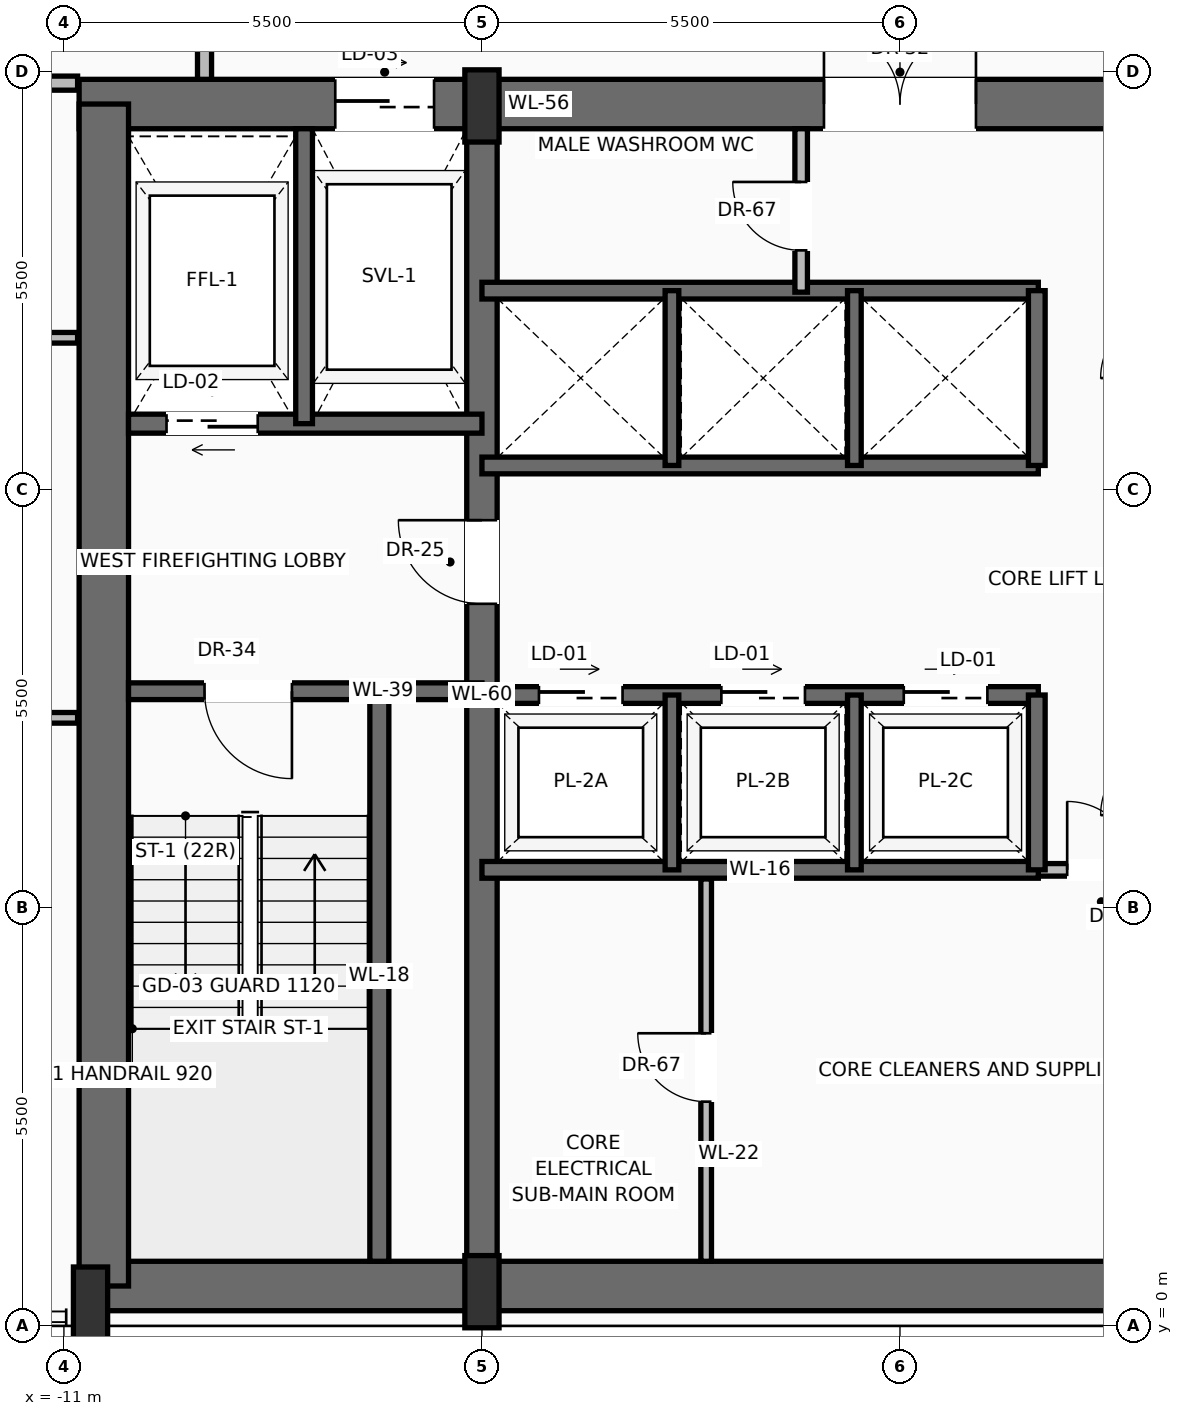
"""IFC4 building model, lengths in metres.
Left out: names, types, materials, properties, quantities, classifications, styles, units other than length and angle.
Written with IfcOpenShell. Run it as: python <this file> out.ifc"""

import sys

from ifc_helpers import new_model, si_unit, direction, frame, frame_2d, origin, origin_2d, place, context, subcontext, project, spatial, rectangle, extrude, source, transform, mapped, element, fill, save


model = new_model("IFC4")
c1 = context("Model", 3, precision=1e-05, world=origin(), true_north=direction((0.0, 1.0)))
c2 = subcontext(c1, "Body", "Model", "MODEL_VIEW")
j1 = project(units=[si_unit("LENGTHUNIT", "METRE"), si_unit("PLANEANGLEUNIT", "RADIAN")], contexts=[c1])
p1 = place(None, origin())
s1 = spatial("IfcSite", under=j1, at=p1, CompositionType="ELEMENT")
p2 = place(p1, origin())
s2 = spatial("IfcBuilding", under=s1, at=p2, CompositionType="ELEMENT")
p3 = place(p2, frame((0.0, 0.0, 189.5)))
s3 = spatial("IfcBuildingStorey", under=s2, at=p3, CompositionType="ELEMENT", Elevation=189.5)
p4 = place(p3, frame((-10.65, 0.525, 0.0), z_axis=(0.0, 0.0, 1.0), x_axis=(1.0, 0.0, 0.0)))
e1 = element("IfcWall", 1, at=p4, inside=s3, PredefinedType="SHEAR", context=c2, shape_type="SweptSolid", body=[
    extrude(rectangle(XDim=21.3, YDim=0.65, at=frame_2d((10.65, 0.0))), origin(), (0.0, 0.0, 1.0), 3.47),
])
p5 = place(p3, frame((-10.8, 16.075, 0.0), z_axis=(0.0, 0.0, 1.0), x_axis=(1.0, 0.0, 0.0)))
e2 = element("IfcWall", 2, at=p5, inside=s3, PredefinedType="SHEAR", context=c2, shape_type="SweptSolid", body=[
    extrude(rectangle(XDim=21.6, YDim=0.65, at=frame_2d((10.8, 0.0))), origin(), (0.0, 0.0, 1.0), 3.47),
])
p6 = place(p5, frame((3.37, 0.0, 0.0)))
e3 = element("IfcOpeningElement", 3, at=p6, cuts=e2, PredefinedType="OPENING", context=c2, shape_type="SweptSolid", body=[
    extrude(rectangle(XDim=1.3, YDim=2.3, at=frame_2d((0.65, 1.15))), frame((0.0, 0.335, 0.0), z_axis=(0.0, -1.0, 0.0), x_axis=(1.0, 0.0, 0.0)), (0.0, 0.0, 1.0), 0.67),
])
p7 = place(p5, frame((9.8, 0.0, 0.0)))
e4 = element("IfcOpeningElement", 4, at=p7, cuts=e2, PredefinedType="OPENING", context=c2, shape_type="SweptSolid", body=[
    extrude(rectangle(XDim=2.0, YDim=2.4, at=frame_2d((1.0, 1.2))), frame((0.0, 0.335, 0.0), z_axis=(0.0, -1.0, 0.0), x_axis=(1.0, 0.0, 0.0)), (0.0, 0.0, 1.0), 0.67),
])
p8 = place(p3, frame((-10.475, 0.525, 0.0), z_axis=(0.0, 0.0, 1.0), x_axis=(0.0, 1.0, 0.0)))
e5 = element("IfcWall", 5, at=p8, inside=s3, PredefinedType="SHEAR", context=c2, shape_type="SweptSolid", body=[
    extrude(rectangle(XDim=15.55, YDim=0.65, at=frame_2d((7.775, 0.0))), origin(), (0.0, 0.0, 1.0), 3.47),
])
p9 = place(p3, frame((-5.5, 0.525, 0.0), z_axis=(0.0, 0.0, 1.0), x_axis=(0.0, 1.0, 0.0)))
e6 = element("IfcWall", 6, at=p9, inside=s3, PredefinedType="SHEAR", context=c2, shape_type="SweptSolid", body=[
    extrude(rectangle(XDim=15.55, YDim=0.4, at=frame_2d((7.775, 0.0))), origin(), (0.0, 0.0, 1.0), 3.47),
])
p10 = place(p9, frame((8.975, 0.0, 0.0)))
e7 = element("IfcOpeningElement", 7, at=p10, cuts=e6, PredefinedType="OPENING", context=c2, shape_type="SweptSolid", body=[
    extrude(rectangle(XDim=1.1, YDim=2.2, at=frame_2d((0.55, 1.1))), frame((0.0, 0.21, 0.0), z_axis=(0.0, -1.0, 0.0), x_axis=(1.0, 0.0, 0.0)), (0.0, 0.0, 1.0), 0.42),
])
m1 = source(origin(), c2, "Body", "SweptSolid", [
    extrude(rectangle(XDim=0.45, YDim=0.95, at=origin_2d()), origin(), (0.0, 0.0, 1.0), 3.7),
])
for number, where, z_axis, x_axis in (
    (8, (-10.65, 0.3, 0.0), (0.0, 0.0, 1.0), (1.0, 0.0, 0.0)),
    (9, (-5.5, 0.45, 0.0), (0.0, 0.0, 1.0), (1.0, 0.0, 0.0)),
    (10, (-5.5, 16.05, 0.0), (0.0, 0.0, 1.0), (1.0, 0.0, 0.0)),
):
    element("IfcColumn", number, at=place(p3, frame(where, z_axis=z_axis, x_axis=x_axis)), inside=s3, PredefinedType="PILASTER", context=c2, shape_type="MappedRepresentation", body=[
        mapped(m1, transform((0.0, 0.0, 0.0), scale=1.0)),
    ])
p11 = place(p3, frame((-20.322, 16.21, 0.0), z_axis=(0.0, 0.0, 1.0), x_axis=(0.525894981058, 0.850549509963, 0.0)))
e11 = element("IfcWall", 11, at=p11, inside=s3, PredefinedType="SOLIDWALL", context=c2, shape_type="SweptSolid", body=[
    extrude(rectangle(XDim=18.948, YDim=0.28, at=frame_2d((9.474, 0.0))), origin(), (0.0, 0.0, 1.0), 3.05),
])
p12 = place(p11, frame((4.547, 0.0, 0.0)))
e12 = element("IfcOpeningElement", 12, at=p12, cuts=e11, PredefinedType="OPENING", context=c2, shape_type="SweptSolid", body=[
    extrude(rectangle(XDim=1.6, YDim=2.35, at=frame_2d((0.8, 1.175))), frame((0.0, 0.15, 0.0), z_axis=(0.0, -1.0, 0.0), x_axis=(1.0, 0.0, 0.0)), (0.0, 0.0, 1.0), 0.3),
])
p13 = place(p11, frame((12.884, 0.0, 0.9)))
e13 = element("IfcOpeningElement", 13, at=p13, cuts=e11, PredefinedType="OPENING", context=c2, shape_type="SweptSolid", body=[
    extrude(rectangle(XDim=2.0, YDim=1.85, at=frame_2d((1.0, 0.925))), frame((0.0, 0.15, 0.0), z_axis=(0.0, -1.0, 0.0), x_axis=(1.0, 0.0, 0.0)), (0.0, 0.0, 1.0), 0.3),
])
p14 = place(p3, frame((-6.85, 0.85, 0.0), z_axis=(0.0, 0.0, 1.0), x_axis=(0.0, 1.0, 0.0)))
e14 = element("IfcWall", 14, at=p14, inside=s3, PredefinedType="SOLIDWALL", context=c2, shape_type="SweptSolid", body=[
    extrude(rectangle(XDim=7.5, YDim=0.25, at=frame_2d((3.75, 0.0))), origin(), (0.0, 0.0, 1.0), 3.47),
])
p15 = place(p3, frame((-5.5, 8.35, 0.0), z_axis=(0.0, 0.0, 1.0), x_axis=(-1.0, 0.0, 0.0)))
e15 = element("IfcWall", 15, at=p15, inside=s3, PredefinedType="SOLIDWALL", context=c2, shape_type="SweptSolid", body=[
    extrude(rectangle(XDim=4.65, YDim=0.22, at=frame_2d((2.325, 0.0))), origin(), (0.0, 0.0, 1.0), 3.47),
])
p16 = place(p15, frame((2.5, 0.0, 0.0)))
e16 = element("IfcOpeningElement", 16, at=p16, cuts=e15, PredefinedType="OPENING", context=c2, shape_type="SweptSolid", body=[
    extrude(rectangle(XDim=1.15, YDim=2.2, at=frame_2d((0.575, 1.1))), frame((0.0, 0.12, 0.0), z_axis=(0.0, -1.0, 0.0), x_axis=(1.0, 0.0, 0.0)), (0.0, 0.0, 1.0), 0.24),
])
p17 = place(p3, frame((-5.5, 11.87, 0.0), z_axis=(0.0, 0.0, 1.0), x_axis=(-1.0, 0.0, 0.0)))
e17 = element("IfcWall", 17, at=p17, inside=s3, PredefinedType="SOLIDWALL", context=c2, shape_type="SweptSolid", body=[
    extrude(rectangle(XDim=4.65, YDim=0.25, at=frame_2d((2.325, 0.0))), origin(), (0.0, 0.0, 1.0), 3.47),
])
p18 = place(p17, frame((2.95, 0.0, 0.0)))
e18 = element("IfcOpeningElement", 18, at=p18, cuts=e17, PredefinedType="OPENING", context=c2, shape_type="SweptSolid", body=[
    extrude(rectangle(XDim=1.2, YDim=2.25, at=frame_2d((0.6, 1.125))), frame((0.0, 0.135, 0.0), z_axis=(0.0, -1.0, 0.0), x_axis=(1.0, 0.0, 0.0)), (0.0, 0.0, 1.0), 0.27),
])
p19 = place(p3, frame((-7.84, 11.87, 0.0), z_axis=(0.0, 0.0, 1.0), x_axis=(0.0, 1.0, 0.0)))
e19 = element("IfcWall", 19, at=p19, inside=s3, PredefinedType="SOLIDWALL", context=c2, shape_type="SweptSolid", body=[
    extrude(rectangle(XDim=3.88, YDim=0.22, at=frame_2d((1.94, 0.0))), origin(), (0.0, 0.0, 1.0), 3.47),
])
p20 = place(p3, frame((1.82, 6.0, 0.0), z_axis=(0.0, 0.0, 1.0), x_axis=(1.0, 0.0, 0.0)))
e20 = element("IfcWall", 20, at=p20, inside=s3, PredefinedType="PARTITIONING", context=c2, shape_type="SweptSolid", body=[
    extrude(rectangle(XDim=3.48, YDim=0.165, at=frame_2d((1.74, 0.0))), origin(), (0.0, 0.0, 1.0), 3.462),
])
p21 = place(p20, frame((0.38, 0.0, 0.0)))
e21 = element("IfcOpeningElement", 21, at=p21, cuts=e20, PredefinedType="OPENING", context=c2, shape_type="SweptSolid", body=[
    extrude(rectangle(XDim=0.9, YDim=2.1, at=frame_2d((0.45, 1.05))), frame((0.0, 0.093, 0.0), z_axis=(0.0, -1.0, 0.0), x_axis=(1.0, 0.0, 0.0)), (0.0, 0.0, 1.0), 0.185),
])
p22 = place(p3, frame((-2.55, 0.85, 0.0), z_axis=(0.0, 0.0, 1.0), x_axis=(0.0, 1.0, 0.0)))
e22 = element("IfcWall", 22, at=p22, inside=s3, PredefinedType="PARTITIONING", context=c2, shape_type="SweptSolid", body=[
    extrude(rectangle(XDim=5.03, YDim=0.14, at=frame_2d((2.515, 0.0))), origin(), (0.0, 0.0, 1.0), 3.462),
])
p23 = place(p22, frame((2.1, 0.0, 0.0)))
e23 = element("IfcOpeningElement", 23, at=p23, cuts=e22, PredefinedType="OPENING", context=c2, shape_type="SweptSolid", body=[
    extrude(rectangle(XDim=0.9, YDim=2.1, at=frame_2d((0.45, 1.05))), frame((0.0, 0.08, 0.0), z_axis=(0.0, -1.0, 0.0), x_axis=(1.0, 0.0, 0.0)), (0.0, 0.0, 1.0), 0.16),
])
p24 = place(p3, frame((-5.5, 6.0, 0.0), z_axis=(0.0, 0.0, 1.0), x_axis=(1.0, 0.0, 0.0)))
e24 = element("IfcWall", 24, at=p24, inside=s3, PredefinedType="SOLIDWALL", context=c2, shape_type="SweptSolid", body=[
    extrude(rectangle(XDim=7.32, YDim=0.22, at=frame_2d((3.66, 0.0))), origin(), (0.0, 0.0, 1.0), 3.47),
])
p25 = place(p3, frame((-5.5, 8.3, 0.0), z_axis=(0.0, 0.0, 1.0), x_axis=(1.0, 0.0, 0.0)))
e25 = element("IfcWall", 25, at=p25, inside=s3, PredefinedType="SOLIDWALL", context=c2, shape_type="SweptSolid", body=[
    extrude(rectangle(XDim=7.32, YDim=0.22, at=frame_2d((3.66, 0.0))), origin(), (0.0, 0.0, 1.0), 3.47),
])
p26 = place(p25, frame((0.75, 0.0, 0.0)))
e26 = element("IfcOpeningElement", 26, at=p26, cuts=e25, PredefinedType="OPENING", context=c2, shape_type="SweptSolid", body=[
    extrude(rectangle(XDim=1.1, YDim=2.2, at=frame_2d((0.55, 1.1))), frame((0.0, 0.12, 0.0), z_axis=(0.0, -1.0, 0.0), x_axis=(1.0, 0.0, 0.0)), (0.0, 0.0, 1.0), 0.24),
])
p27 = place(p25, frame((3.15, 0.0, 0.0)))
e27 = element("IfcOpeningElement", 27, at=p27, cuts=e25, PredefinedType="OPENING", context=c2, shape_type="SweptSolid", body=[
    extrude(rectangle(XDim=1.1, YDim=2.2, at=frame_2d((0.55, 1.1))), frame((0.0, 0.12, 0.0), z_axis=(0.0, -1.0, 0.0), x_axis=(1.0, 0.0, 0.0)), (0.0, 0.0, 1.0), 0.24),
])
p28 = place(p25, frame((5.55, 0.0, 0.0)))
e28 = element("IfcOpeningElement", 28, at=p28, cuts=e25, PredefinedType="OPENING", context=c2, shape_type="SweptSolid", body=[
    extrude(rectangle(XDim=1.1, YDim=2.2, at=frame_2d((0.55, 1.1))), frame((0.0, 0.12, 0.0), z_axis=(0.0, -1.0, 0.0), x_axis=(1.0, 0.0, 0.0)), (0.0, 0.0, 1.0), 0.24),
])
p29 = place(p3, frame((1.8, 6.0, 0.0), z_axis=(0.0, 0.0, 1.0), x_axis=(0.0, 1.0, 0.0)))
e29 = element("IfcWall", 29, at=p29, inside=s3, PredefinedType="SOLIDWALL", context=c2, shape_type="SweptSolid", body=[
    extrude(rectangle(XDim=2.3, YDim=0.22, at=frame_2d((1.15, 0.0))), origin(), (0.0, 0.0, 1.0), 3.47),
])
for number, where, z_axis, x_axis in (
    (30, (-3.0, 6.0, 0.0), (0.0, 0.0, 1.0), (0.0, 1.0, 0.0)),
    (31, (-0.6, 6.0, 0.0), (0.0, 0.0, 1.0), (0.0, 1.0, 0.0)),
):
    element("IfcWall", number, at=place(p3, frame(where, z_axis=z_axis, x_axis=x_axis)), inside=s3, PredefinedType="SOLIDWALL", context=c2, shape_type="SweptSolid", body=[
        extrude(rectangle(XDim=2.3, YDim=0.18, at=frame_2d((1.15, 0.0))), origin(), (0.0, 0.0, 1.0), 3.47),
    ])
for number, where, z_axis, x_axis in (
    (32, (-5.5, 11.32, 0.0), (0.0, 0.0, 1.0), (1.0, 0.0, 0.0)),
    (33, (-5.5, 13.62, 0.0), (0.0, 0.0, 1.0), (1.0, 0.0, 0.0)),
):
    element("IfcWall", number, at=place(p3, frame(where, z_axis=z_axis, x_axis=x_axis)), inside=s3, PredefinedType="SOLIDWALL", context=c2, shape_type="SweptSolid", body=[
        extrude(rectangle(XDim=7.32, YDim=0.22, at=frame_2d((3.66, 0.0))), origin(), (0.0, 0.0, 1.0), 3.47),
    ])
p30 = place(p3, frame((1.8, 11.32, 0.0), z_axis=(0.0, 0.0, 1.0), x_axis=(0.0, 1.0, 0.0)))
e34 = element("IfcWall", 34, at=p30, inside=s3, PredefinedType="SOLIDWALL", context=c2, shape_type="SweptSolid", body=[
    extrude(rectangle(XDim=2.3, YDim=0.22, at=frame_2d((1.15, 0.0))), origin(), (0.0, 0.0, 1.0), 3.47),
])
for number, where, z_axis, x_axis in (
    (35, (-3.0, 11.32, 0.0), (0.0, 0.0, 1.0), (0.0, 1.0, 0.0)),
    (36, (-0.6, 11.32, 0.0), (0.0, 0.0, 1.0), (0.0, 1.0, 0.0)),
):
    element("IfcWall", number, at=place(p3, frame(where, z_axis=z_axis, x_axis=x_axis)), inside=s3, PredefinedType="SOLIDWALL", context=c2, shape_type="SweptSolid", body=[
        extrude(rectangle(XDim=2.3, YDim=0.18, at=frame_2d((1.15, 0.0))), origin(), (0.0, 0.0, 1.0), 3.47),
    ])
p31 = place(p3, frame((-1.3, 13.6, 0.0), z_axis=(0.0, 0.0, 1.0), x_axis=(0.0, 1.0, 0.0)))
e37 = element("IfcWall", 37, at=p31, inside=s3, PredefinedType="PARTITIONING", context=c2, shape_type="SweptSolid", body=[
    extrude(rectangle(XDim=2.15, YDim=0.165, at=frame_2d((1.075, 0.0))), origin(), (0.0, 0.0, 1.0), 3.462),
])
p32 = place(p31, frame((0.55, 0.0, 0.0)))
e38 = element("IfcOpeningElement", 38, at=p32, cuts=e37, PredefinedType="OPENING", context=c2, shape_type="SweptSolid", body=[
    extrude(rectangle(XDim=0.9, YDim=2.1, at=frame_2d((0.45, 1.05))), frame((0.0, 0.093, 0.0), z_axis=(0.0, -1.0, 0.0), x_axis=(1.0, 0.0, 0.0)), (0.0, 0.0, 1.0), 0.185),
])
p33 = place(p3, frame((-9.15, 16.4, 0.0), z_axis=(0.0, 0.0, 1.0), x_axis=(0.0, 1.0, 0.0)))
e39 = element("IfcWall", 39, at=p33, inside=s3, PredefinedType="PARTITIONING", context=c2, shape_type="SweptSolid", body=[
    extrude(rectangle(XDim=7.0, YDim=0.185, at=frame_2d((3.5, 0.0))), origin(), (0.0, 0.0, 1.0), 3.462),
])
p34 = place(p33, frame((2.709, 0.0, 0.0)))
e40 = element("IfcOpeningElement", 40, at=p34, cuts=e39, PredefinedType="OPENING", context=c2, shape_type="SweptSolid", body=[
    extrude(rectangle(XDim=0.95, YDim=2.2, at=frame_2d((0.475, 1.1))), frame((0.0, 0.103, 0.0), z_axis=(0.0, -1.0, 0.0), x_axis=(1.0, 0.0, 0.0)), (0.0, 0.0, 1.0), 0.205),
])
p35 = place(p3, frame((-20.389, 16.35, 0.0), z_axis=(0.0, 0.0, 1.0), x_axis=(1.0, 0.0, 0.0)))
e41 = element("IfcWall", 41, at=p35, inside=s3, PredefinedType="PARTITIONING", context=c2, shape_type="SweptSolid", body=[
    extrude(rectangle(XDim=9.569, YDim=0.185, at=frame_2d((4.784, 0.0))), origin(), (0.0, 0.0, 1.0), 3.462),
])
p36 = place(p35, frame((5.643, 0.0, 0.0)))
e42 = element("IfcOpeningElement", 42, at=p36, cuts=e41, PredefinedType="OPENING", context=c2, shape_type="SweptSolid", body=[
    extrude(rectangle(XDim=0.95, YDim=2.2, at=frame_2d((0.475, 1.1))), frame((0.0, 0.103, 0.0), z_axis=(0.0, -1.0, 0.0), x_axis=(1.0, 0.0, 0.0)), (0.0, 0.0, 1.0), 0.205),
])
p37 = place(p3, frame((-25.552, 8.0, 0.0), z_axis=(0.0, 0.0, 1.0), x_axis=(1.0, 0.0, 0.0)))
e43 = element("IfcWall", 43, at=p37, inside=s3, PredefinedType="PARTITIONING", context=c2, shape_type="SweptSolid", body=[
    extrude(rectangle(XDim=14.731, YDim=0.14, at=frame_2d((7.366, 0.0))), origin(), (0.0, 0.0, 1.0), 3.462),
])
p38 = place(p37, frame((6.897, 0.0, 0.0)))
e44 = element("IfcOpeningElement", 44, at=p38, cuts=e43, PredefinedType="OPENING", context=c2, shape_type="SweptSolid", body=[
    extrude(rectangle(XDim=0.95, YDim=2.2, at=frame_2d((0.475, 1.1))), frame((0.0, 0.08, 0.0), z_axis=(0.0, -1.0, 0.0), x_axis=(1.0, 0.0, 0.0)), (0.0, 0.0, 1.0), 0.16),
])
p39 = place(p3, frame((-22.46, 13.0, 0.0), z_axis=(0.0, 0.0, 1.0), x_axis=(1.0, 0.0, 0.0)))
e45 = element("IfcWall", 45, at=p39, inside=s3, PredefinedType="PARTITIONING", context=c2, shape_type="SweptSolid", body=[
    extrude(rectangle(XDim=11.64, YDim=0.14, at=frame_2d((5.82, 0.0))), origin(), (0.0, 0.0, 1.0), 3.462),
])
p40 = place(p39, frame((5.351, 0.0, 0.0)))
e46 = element("IfcOpeningElement", 46, at=p40, cuts=e45, PredefinedType="OPENING", context=c2, shape_type="SweptSolid", body=[
    extrude(rectangle(XDim=0.95, YDim=2.2, at=frame_2d((0.475, 1.1))), frame((0.0, 0.08, 0.0), z_axis=(0.0, -1.0, 0.0), x_axis=(1.0, 0.0, 0.0)), (0.0, 0.0, 1.0), 0.16),
])
m2 = source(origin(), c2, "Body", "SweptSolid", [
    extrude(rectangle(XDim=1.15, YDim=2.2, at=frame_2d((0.575, 1.1))), frame((0.0, 0.025, 0.0), z_axis=(0.0, -1.0, 0.0), x_axis=(1.0, 0.0, 0.0)), (0.0, 0.0, 1.0), 0.05),
])
p41 = place(p16, origin())
e47 = element("IfcDoor", 47, at=p41, inside=s3, OperationType="SINGLE_SWING_LEFT", PredefinedType="DOOR", context=c2, shape_type="MappedRepresentation", body=[
    mapped(m2, transform((0.0, 0.0, 0.0), scale=1.0)),
])
fill(e16, e47)
m3 = source(origin(), c2, "Body", "SweptSolid", [
    extrude(rectangle(XDim=1.1, YDim=2.2, at=frame_2d((0.55, 1.1))), frame((0.0, 0.025, 0.0), z_axis=(0.0, -1.0, 0.0), x_axis=(1.0, 0.0, 0.0)), (0.0, 0.0, 1.0), 0.05),
])
p42 = place(p10, origin())
e48 = element("IfcDoor", 48, at=p42, inside=s3, OperationType="SINGLE_SWING_RIGHT", PredefinedType="DOOR", context=c2, shape_type="MappedRepresentation", body=[
    mapped(m3, transform((0.0, 0.0, 0.0), scale=1.0)),
])
fill(e7, e48)
m4 = source(origin(), c2, "Body", "SweptSolid", [
    extrude(rectangle(XDim=1.2, YDim=2.25, at=frame_2d((0.6, 1.125))), frame((0.0, 0.025, 0.0), z_axis=(0.0, -1.0, 0.0), x_axis=(1.0, 0.0, 0.0)), (0.0, 0.0, 1.0), 0.05),
])
p43 = place(p18, origin())
e49 = element("IfcDoor", 49, at=p43, inside=s3, OperationType="SLIDING_TO_LEFT", PredefinedType="DOOR", context=c2, shape_type="MappedRepresentation", body=[
    mapped(m4, transform((0.0, 0.0, 0.0), scale=1.0)),
])
fill(e18, e49)
m5 = source(origin(), c2, "Body", "SweptSolid", [
    extrude(rectangle(XDim=1.3, YDim=2.3, at=frame_2d((0.65, 1.15))), frame((0.0, 0.025, 0.0), z_axis=(0.0, -1.0, 0.0), x_axis=(1.0, 0.0, 0.0)), (0.0, 0.0, 1.0), 0.05),
])
p44 = place(p6, origin())
e50 = element("IfcDoor", 50, at=p44, inside=s3, OperationType="SLIDING_TO_RIGHT", PredefinedType="DOOR", context=c2, shape_type="MappedRepresentation", body=[
    mapped(m5, transform((0.0, 0.0, 0.0), scale=1.0)),
])
fill(e3, e50)
m6 = source(origin(), c2, "Body", "SweptSolid", [
    extrude(rectangle(XDim=2.0, YDim=2.4, at=frame_2d((1.0, 1.2))), frame((0.0, 0.025, 0.0), z_axis=(0.0, -1.0, 0.0), x_axis=(1.0, 0.0, 0.0)), (0.0, 0.0, 1.0), 0.05),
])
p45 = place(p7, origin())
e51 = element("IfcDoor", 51, at=p45, inside=s3, OperationType="DOUBLE_DOOR_SINGLE_SWING", PredefinedType="DOOR", context=c2, shape_type="MappedRepresentation", body=[
    mapped(m6, transform((0.0, 0.0, 0.0), scale=1.0)),
])
fill(e4, e51)
m7 = source(origin(), c2, "Body", "SweptSolid", [
    extrude(rectangle(XDim=0.9, YDim=2.1, at=frame_2d((0.45, 1.05))), frame((0.0, 0.025, 0.0), z_axis=(0.0, -1.0, 0.0), x_axis=(1.0, 0.0, 0.0)), (0.0, 0.0, 1.0), 0.05),
])
p46 = place(p21, origin())
e52 = element("IfcDoor", 52, at=p46, inside=s3, OperationType="SINGLE_SWING_LEFT", PredefinedType="DOOR", context=c2, shape_type="MappedRepresentation", body=[
    mapped(m7, transform((0.0, 0.0, 0.0), scale=1.0)),
])
fill(e21, e52)
p47 = place(p23, origin())
e53 = element("IfcDoor", 53, at=p47, inside=s3, OperationType="SINGLE_SWING_RIGHT", PredefinedType="DOOR", context=c2, shape_type="MappedRepresentation", body=[
    mapped(m7, transform((0.0, 0.0, 0.0), scale=1.0)),
])
fill(e23, e53)
m8 = source(origin(), c2, "Body", "SweptSolid", [
    extrude(rectangle(XDim=1.1, YDim=2.2, at=frame_2d((0.55, 1.1))), frame((0.0, 0.025, 0.0), z_axis=(0.0, -1.0, 0.0), x_axis=(1.0, 0.0, 0.0)), (0.0, 0.0, 1.0), 0.05),
])
p48 = place(p26, origin())
e54 = element("IfcDoor", 54, at=p48, inside=s3, OperationType="SLIDING_TO_LEFT", PredefinedType="DOOR", context=c2, shape_type="MappedRepresentation", body=[
    mapped(m8, transform((0.0, 0.0, 0.0), scale=1.0)),
])
fill(e26, e54)
p49 = place(p27, origin())
e55 = element("IfcDoor", 55, at=p49, inside=s3, OperationType="SLIDING_TO_LEFT", PredefinedType="DOOR", context=c2, shape_type="MappedRepresentation", body=[
    mapped(m8, transform((0.0, 0.0, 0.0), scale=1.0)),
])
fill(e27, e55)
p50 = place(p28, origin())
e56 = element("IfcDoor", 56, at=p50, inside=s3, OperationType="SLIDING_TO_LEFT", PredefinedType="DOOR", context=c2, shape_type="MappedRepresentation", body=[
    mapped(m8, transform((0.0, 0.0, 0.0), scale=1.0)),
])
fill(e28, e56)
p51 = place(p32, origin())
e57 = element("IfcDoor", 57, at=p51, inside=s3, OperationType="SINGLE_SWING_RIGHT", PredefinedType="DOOR", context=c2, shape_type="MappedRepresentation", body=[
    mapped(m7, transform((0.0, 0.0, 0.0), scale=1.0)),
])
fill(e38, e57)
save(model, sys.argv[1])
